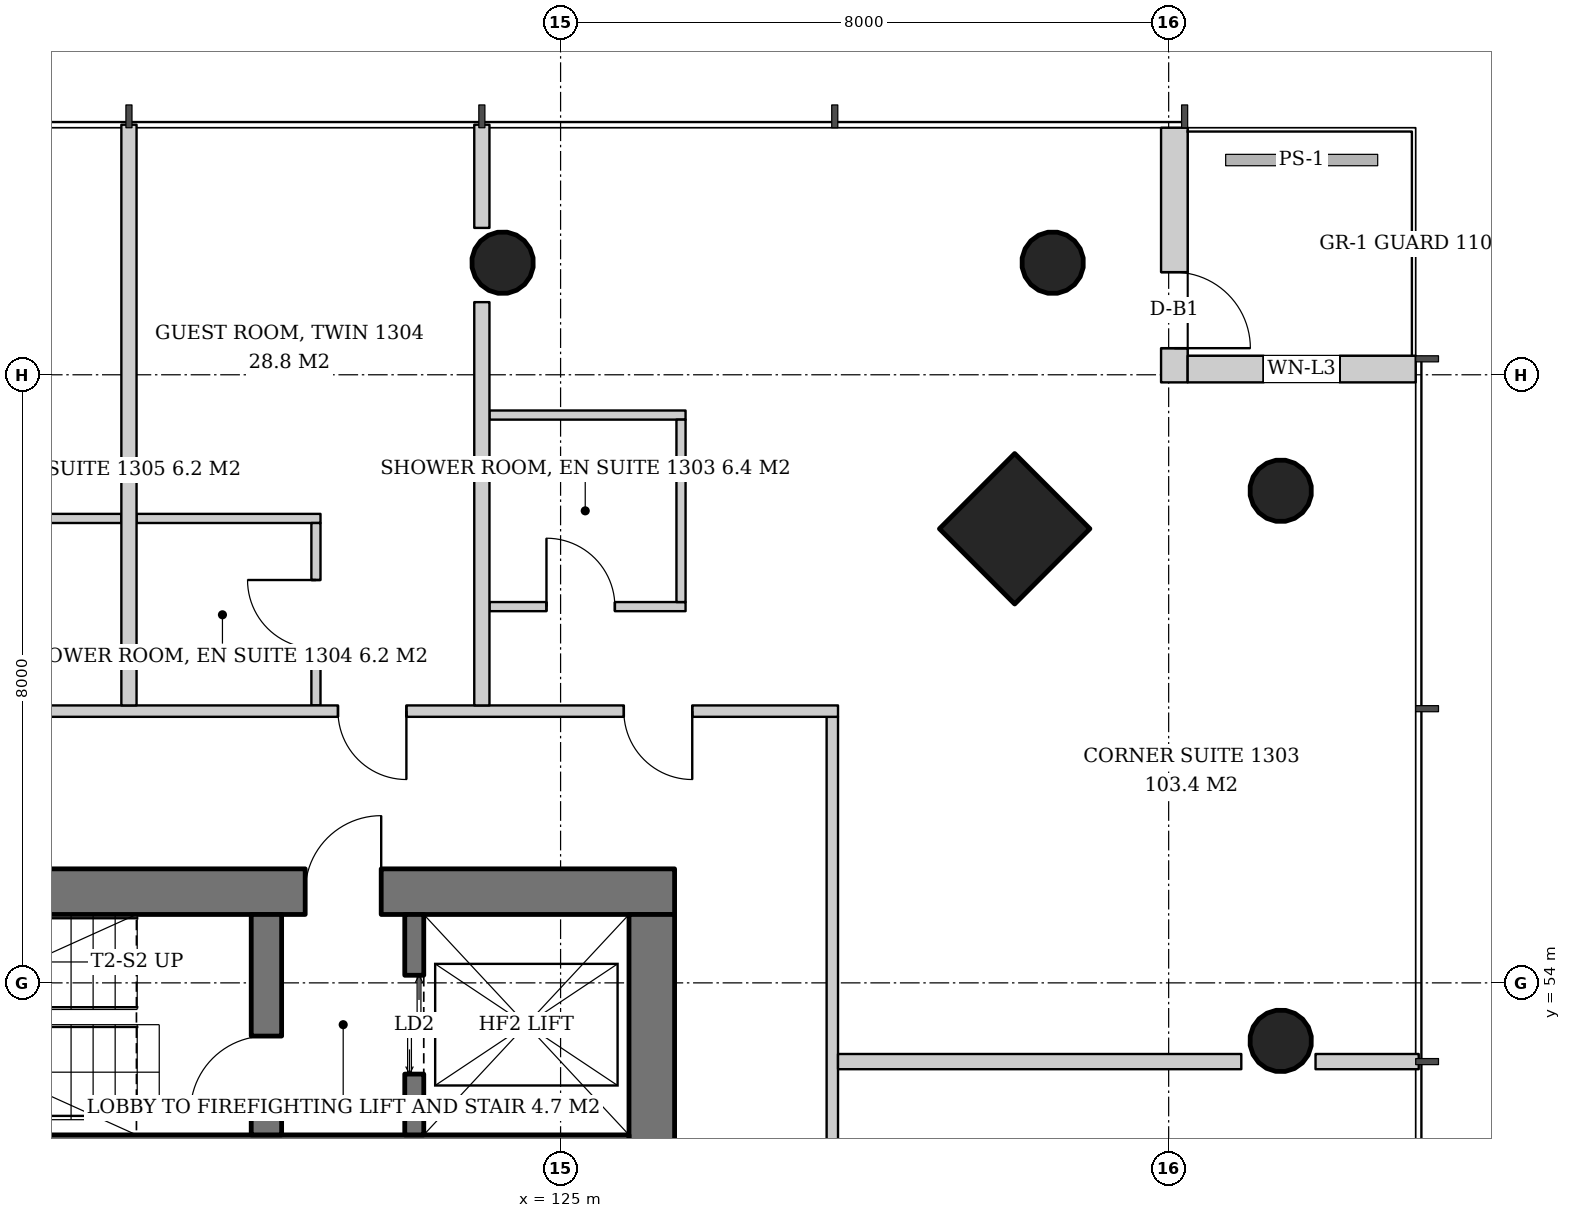
"""IFC4 building model, lengths in metres.
Left out: names, types, materials, properties, quantities, classifications, styles, units other than length and angle.
Written with IfcOpenShell. Run it as: python <this file> out.ifc"""

import sys

from ifc_helpers import new_model, si_unit, direction, frame, frame_2d, origin, origin_2d, place, context, subcontext, project, spatial, rectangle, hollow_circle, extrude, element, fill, save


model = new_model("IFC4")
c1 = context("Model", 3, precision=1e-05, world=origin(), true_north=direction((0.0, 1.0)))
c2 = subcontext(c1, "Body", "Model", "MODEL_VIEW")
j1 = project(units=[si_unit("LENGTHUNIT", "METRE"), si_unit("PLANEANGLEUNIT", "RADIAN")], contexts=[c1])
p1 = place(None, origin())
s1 = spatial("IfcSite", under=j1, at=p1, CompositionType="ELEMENT")
p2 = place(p1, origin())
s2 = spatial("IfcBuilding", under=s1, at=p2, CompositionType="ELEMENT")
p3 = place(p2, frame((0.0, 0.0, 55.2)))
s3 = spatial("IfcBuildingStorey", under=s2, at=p3, CompositionType="ELEMENT", Elevation=55.2)
p4 = place(p3, frame((131.026, 60.026, 0.0), z_axis=(-0.043029647111, -0.043029647111, 0.998146732169), x_axis=(0.707106781187, -0.707106781187, 0.0)))
e1 = element("IfcColumn", 1, at=p4, inside=s3, PredefinedType="COLUMN", context=c2, shape_type="SweptSolid", body=[
    extrude(rectangle(XDim=1.4, YDim=1.4, at=origin_2d()), origin(), (0.0, 0.0, 1.0), 3.807),
])
p5 = place(p3, frame((134.526, 60.526, 0.0), z_axis=(-0.043029647111, -0.043029647111, 0.998146732169), x_axis=(0.707106781187, -0.707106781187, 0.0)))
e2 = element("IfcColumn", 2, at=p5, inside=s3, PredefinedType="COLUMN", context=c2, shape_type="SweptSolid", body=[
    extrude(hollow_circle(Radius=0.406, WallThickness=0.03, at=origin_2d()), origin(), (0.0, 0.0, 1.0), 3.807),
])
p6 = place(p3, frame((134.526, 53.263, 0.0), z_axis=(-0.043059584825, -0.021497706284, 0.998841188968), x_axis=(0.446680166538, -0.894693706707, 0.0)))
e3 = element("IfcColumn", 3, at=p6, inside=s3, PredefinedType="COLUMN", context=c2, shape_type="SweptSolid", body=[
    extrude(hollow_circle(Radius=0.406, WallThickness=0.03, at=origin_2d()), origin(), (0.0, 0.0, 1.0), 3.804),
])
p7 = place(p3, frame((131.526, 63.526, 0.0), z_axis=(-0.043029647111, -0.043029647111, 0.998146732169), x_axis=(0.707106781187, -0.707106781187, 0.0)))
e4 = element("IfcColumn", 4, at=p7, inside=s3, PredefinedType="COLUMN", context=c2, shape_type="SweptSolid", body=[
    extrude(hollow_circle(Radius=0.406, WallThickness=0.03, at=origin_2d()), origin(), (0.0, 0.0, 1.0), 3.807),
])
p8 = place(p3, frame((124.263, 63.526, 0.0), z_axis=(-0.021497706284, -0.043059584825, 0.998841188968), x_axis=(0.894693706707, -0.446680166538, 0.0)))
e5 = element("IfcColumn", 5, at=p8, inside=s3, PredefinedType="COLUMN", context=c2, shape_type="SweptSolid", body=[
    extrude(hollow_circle(Radius=0.406, WallThickness=0.03, at=origin_2d()), origin(), (0.0, 0.0, 1.0), 3.804),
])
p9 = place(p3, frame((107.5, 55.2, 0.0), z_axis=(0.0, 0.0, 1.0), x_axis=(1.0, 0.0, 0.0)))
e6 = element("IfcWall", 6, at=p9, inside=s3, PredefinedType="SHEAR", context=c2, shape_type="SweptSolid", body=[
    extrude(rectangle(XDim=19.0, YDim=0.6, at=frame_2d((9.5, 0.0))), origin(), (0.0, 0.0, 1.0), 3.8),
])
p10 = place(p9, frame((14.14, 0.0, 0.0)))
e7 = element("IfcOpeningElement", 7, at=p10, cuts=e6, PredefinedType="OPENING", context=c2, shape_type="SweptSolid", body=[
    extrude(rectangle(XDim=1.0, YDim=2.1, at=frame_2d((0.5, 1.05))), frame((0.0, 0.31, 0.0), z_axis=(0.0, -1.0, 0.0), x_axis=(1.0, 0.0, 0.0)), (0.0, 0.0, 1.0), 0.62),
])
p11 = place(p9, frame((1.675, 0.0, 0.0)))
e8 = element("IfcOpeningElement", 8, at=p11, cuts=e6, PredefinedType="OPENING", context=c2, shape_type="SweptSolid", body=[
    extrude(rectangle(XDim=1.0, YDim=2.1, at=frame_2d((0.5, 1.05))), frame((0.0, 0.31, 0.0), z_axis=(0.0, -1.0, 0.0), x_axis=(1.0, 0.0, 0.0)), (0.0, 0.0, 1.0), 0.62),
])
p12 = place(p9, frame((3.587, 0.0, 0.0)))
e9 = element("IfcOpeningElement", 9, at=p12, cuts=e6, PredefinedType="OPENING", context=c2, shape_type="SweptSolid", body=[
    extrude(rectangle(XDim=1.0, YDim=2.1, at=frame_2d((0.5, 1.05))), frame((0.0, 0.31, 0.0), z_axis=(0.0, -1.0, 0.0), x_axis=(1.0, 0.0, 0.0)), (0.0, 0.0, 1.0), 0.62),
])
p13 = place(p3, frame((126.2, 37.1, 0.0), z_axis=(0.0, 0.0, 1.0), x_axis=(0.0, 1.0, 0.0)))
e10 = element("IfcWall", 10, at=p13, inside=s3, PredefinedType="SHEAR", context=c2, shape_type="SweptSolid", body=[
    extrude(rectangle(XDim=17.8, YDim=0.6, at=frame_2d((8.9, 0.0))), origin(), (0.0, 0.0, 1.0), 3.8),
])
p14 = place(p13, frame((8.0, 0.0, 0.0)))
e11 = element("IfcOpeningElement", 11, at=p14, cuts=e10, PredefinedType="OPENING", context=c2, shape_type="SweptSolid", body=[
    extrude(rectangle(XDim=1.8, YDim=2.4, at=frame_2d((0.9, 1.2))), frame((0.0, 0.31, 0.0), z_axis=(0.0, -1.0, 0.0), x_axis=(1.0, 0.0, 0.0)), (0.0, 0.0, 1.0), 0.62),
])
p15 = place(p3, frame((108.1, 51.8, 0.0), z_axis=(0.0, 0.0, 1.0), x_axis=(1.0, 0.0, 0.0)))
e12 = element("IfcWall", 12, at=p15, inside=s3, PredefinedType="SHEAR", context=c2, shape_type="SweptSolid", body=[
    extrude(rectangle(XDim=17.8, YDim=0.4, at=frame_2d((8.9, 0.0))), origin(), (0.0, 0.0, 1.0), 3.8),
])
p16 = place(p3, frame((121.13, 52.0, 0.0), z_axis=(0.0, 0.0, 1.0), x_axis=(0.0, 1.0, 0.0)))
e13 = element("IfcWall", 13, at=p16, inside=s3, PredefinedType="SHEAR", context=c2, shape_type="SweptSolid", body=[
    extrude(rectangle(XDim=2.9, YDim=0.4, at=frame_2d((1.45, 0.0))), origin(), (0.0, 0.0, 1.0), 3.8),
])
p17 = place(p16, frame((0.3, 0.0, 0.0)))
e14 = element("IfcOpeningElement", 14, at=p17, cuts=e13, PredefinedType="OPENING", context=c2, shape_type="SweptSolid", body=[
    extrude(rectangle(XDim=1.0, YDim=2.1, at=frame_2d((0.5, 1.05))), frame((0.0, 0.21, 0.0), z_axis=(0.0, -1.0, 0.0), x_axis=(1.0, 0.0, 0.0)), (0.0, 0.0, 1.0), 0.42),
])
p18 = place(p3, frame((133.075, 65.25, 0.0), z_axis=(0.0, 0.0, 1.0), x_axis=(0.0, -1.0, 0.0)))
e15 = element("IfcWall", 15, at=p18, inside=s3, PredefinedType="SOLIDWALL", context=c2, shape_type="SweptSolid", body=[
    extrude(rectangle(XDim=3.35, YDim=0.35, at=frame_2d((1.675, 0.0))), origin(), (0.0, 0.0, 1.0), 3.6),
])
p19 = place(p18, frame((1.9, 0.0, 0.0)))
e16 = element("IfcOpeningElement", 16, at=p19, cuts=e15, PredefinedType="OPENING", context=c2, shape_type="SweptSolid", body=[
    extrude(rectangle(XDim=1.0, YDim=2.4, at=frame_2d((0.5, 1.2))), frame((0.0, 0.185, 0.0), z_axis=(0.0, -1.0, 0.0), x_axis=(1.0, 0.0, 0.0)), (0.0, 0.0, 1.0), 0.37),
])
p20 = place(p3, frame((133.25, 62.075, 0.0), z_axis=(0.0, 0.0, 1.0), x_axis=(1.0, 0.0, 0.0)))
e17 = element("IfcWall", 17, at=p20, inside=s3, PredefinedType="SOLIDWALL", context=c2, shape_type="SweptSolid", body=[
    extrude(rectangle(XDim=3.0, YDim=0.35, at=frame_2d((1.5, 0.0))), origin(), (0.0, 0.0, 1.0), 3.6),
])
p21 = place(p20, frame((1.0, 0.0, 0.9)))
e18 = element("IfcOpeningElement", 18, at=p21, cuts=e17, PredefinedType="OPENING", context=c2, shape_type="SweptSolid", body=[
    extrude(rectangle(XDim=1.0, YDim=2.4, at=frame_2d((0.5, 1.2))), frame((0.0, 0.185, 0.0), z_axis=(0.0, -1.0, 0.0), x_axis=(1.0, 0.0, 0.0)), (0.0, 0.0, 1.0), 0.37),
])
p22 = place(p3, frame((123.075, 52.0, 0.0), z_axis=(0.0, 0.0, 1.0), x_axis=(0.0, 1.0, 0.0)))
e19 = element("IfcWall", 19, at=p22, inside=s3, PredefinedType="SHEAR", context=c2, shape_type="SweptSolid", body=[
    extrude(rectangle(XDim=2.9, YDim=0.25, at=frame_2d((1.45, 0.0))), origin(), (0.0, 0.0, 1.0), 3.8),
])
p23 = place(p22, frame((0.8, 0.0, 0.0)))
e20 = element("IfcOpeningElement", 20, at=p23, cuts=e19, PredefinedType="OPENING", context=c2, shape_type="SweptSolid", body=[
    extrude(rectangle(XDim=1.3, YDim=2.2, at=frame_2d((0.65, 1.1))), frame((0.0, 0.135, 0.0), z_axis=(0.0, -1.0, 0.0), x_axis=(1.0, 0.0, 0.0)), (0.0, 0.0, 1.0), 0.27),
])
p24 = place(p3, frame((128.575, 34.35, 0.0), z_axis=(0.0, 0.0, 1.0), x_axis=(0.0, 1.0, 0.0)))
e21 = element("IfcWall", 21, at=p24, inside=s3, PredefinedType="PARTITIONING", context=c2, shape_type="SweptSolid", body=[
    extrude(rectangle(XDim=23.15, YDim=0.15, at=frame_2d((11.575, 0.0))), origin(), (0.0, 0.0, 1.0), 2.8),
])
p25 = place(p24, frame((1.918, 0.0, 0.0)))
e22 = element("IfcOpeningElement", 22, at=p25, cuts=e21, PredefinedType="OPENING", context=c2, shape_type="SweptSolid", body=[
    extrude(rectangle(XDim=0.9, YDim=2.1, at=frame_2d((0.45, 1.05))), frame((0.0, 0.085, 0.0), z_axis=(0.0, -1.0, 0.0), x_axis=(1.0, 0.0, 0.0)), (0.0, 0.0, 1.0), 0.17),
])
p26 = place(p24, frame((12.079, 0.0, 0.0)))
e23 = element("IfcOpeningElement", 23, at=p26, cuts=e21, PredefinedType="OPENING", context=c2, shape_type="SweptSolid", body=[
    extrude(rectangle(XDim=0.9, YDim=2.1, at=frame_2d((0.45, 1.05))), frame((0.0, 0.085, 0.0), z_axis=(0.0, -1.0, 0.0), x_axis=(1.0, 0.0, 0.0)), (0.0, 0.0, 1.0), 0.17),
])
p27 = place(p3, frame((128.65, 52.964, 0.0), z_axis=(0.0, 0.0, 1.0), x_axis=(1.0, 0.0, 0.0)))
e24 = element("IfcWall", 24, at=p27, inside=s3, PredefinedType="PARTITIONING", context=c2, shape_type="SweptSolid", body=[
    extrude(rectangle(XDim=5.306, YDim=0.2, at=frame_2d((2.653, 0.0))), origin(), (0.0, 0.0, 1.0), 3.6),
])
p28 = place(p3, frame((134.932, 52.964, 0.0), z_axis=(0.0, 0.0, 1.0), x_axis=(1.0, 0.0, 0.0)))
e25 = element("IfcWall", 25, at=p28, inside=s3, PredefinedType="PARTITIONING", context=c2, shape_type="SweptSolid", body=[
    extrude(rectangle(XDim=1.358, YDim=0.2, at=frame_2d((0.679, 0.0))), origin(), (0.0, 0.0, 1.0), 3.6),
])
p29 = place(p3, frame((124.064, 58.95, 0.0), z_axis=(0.0, 0.0, 1.0), x_axis=(1.0, 0.0, 0.0)))
e26 = element("IfcWall", 26, at=p29, inside=s3, PredefinedType="PARTITIONING", context=c2, shape_type="SweptSolid", body=[
    extrude(rectangle(XDim=2.58, YDim=0.12, at=frame_2d((1.29, 0.0))), origin(), (0.0, 0.0, 1.0), 2.8),
])
p30 = place(p29, frame((0.75, 0.0, 0.0)))
e27 = element("IfcOpeningElement", 27, at=p30, cuts=e26, PredefinedType="OPENING", context=c2, shape_type="SweptSolid", body=[
    extrude(rectangle(XDim=0.9, YDim=2.1, at=frame_2d((0.45, 1.05))), frame((0.0, 0.07, 0.0), z_axis=(0.0, -1.0, 0.0), x_axis=(1.0, 0.0, 0.0)), (0.0, 0.0, 1.0), 0.14),
])
p31 = place(p3, frame((124.064, 61.47, 0.0), z_axis=(0.0, 0.0, 1.0), x_axis=(1.0, 0.0, 0.0)))
e28 = element("IfcWall", 28, at=p31, inside=s3, PredefinedType="PARTITIONING", context=c2, shape_type="SweptSolid", body=[
    extrude(rectangle(XDim=2.58, YDim=0.12, at=frame_2d((1.29, 0.0))), origin(), (0.0, 0.0, 1.0), 2.8),
])
p32 = place(p3, frame((126.584, 59.01, 0.0), z_axis=(0.0, 0.0, 1.0), x_axis=(0.0, 1.0, 0.0)))
e29 = element("IfcWall", 29, at=p32, inside=s3, PredefinedType="PARTITIONING", context=c2, shape_type="SweptSolid", body=[
    extrude(rectangle(XDim=2.4, YDim=0.12, at=frame_2d((1.2, 0.0))), origin(), (0.0, 0.0, 1.0), 2.847),
])
p33 = place(p3, frame((121.841, 60.11, 0.0), z_axis=(0.0, 0.0, 1.0), x_axis=(-1.0, 0.0, 0.0)))
e30 = element("IfcWall", 30, at=p33, inside=s3, PredefinedType="PARTITIONING", context=c2, shape_type="SweptSolid", body=[
    extrude(rectangle(XDim=2.42, YDim=0.12, at=frame_2d((1.21, 0.0))), origin(), (0.0, 0.0, 1.0), 2.847),
])
p34 = place(p3, frame((121.781, 57.65, 0.0), z_axis=(0.0, 0.0, 1.0), x_axis=(0.0, 1.0, 0.0)))
e31 = element("IfcWall", 31, at=p34, inside=s3, PredefinedType="PARTITIONING", context=c2, shape_type="SweptSolid", body=[
    extrude(rectangle(XDim=2.4, YDim=0.12, at=frame_2d((1.2, 0.0))), origin(), (0.0, 0.0, 1.0), 2.847),
])
p35 = place(p34, frame((0.75, 0.0, 0.0)))
e32 = element("IfcOpeningElement", 32, at=p35, cuts=e31, PredefinedType="OPENING", context=c2, shape_type="SweptSolid", body=[
    extrude(rectangle(XDim=0.9, YDim=2.1, at=frame_2d((0.45, 1.05))), frame((0.0, 0.07, 0.0), z_axis=(0.0, -1.0, 0.0), x_axis=(1.0, 0.0, 0.0)), (0.0, 0.0, 1.0), 0.14),
])
p36 = place(p3, frame((119.221, 60.11, 0.0), z_axis=(0.0, 0.0, 1.0), x_axis=(-1.0, 0.0, 0.0)))
e33 = element("IfcWall", 33, at=p36, inside=s3, PredefinedType="PARTITIONING", context=c2, shape_type="SweptSolid", body=[
    extrude(rectangle(XDim=2.42, YDim=0.12, at=frame_2d((1.21, 0.0))), origin(), (0.0, 0.0, 1.0), 2.847),
])
p37 = place(p3, frame((128.65, 57.575, 0.0), z_axis=(0.0, 0.0, 1.0), x_axis=(-1.0, 0.0, 0.0)))
e34 = element("IfcWall", 34, at=p37, inside=s3, PredefinedType="PARTITIONING", context=c2, shape_type="SweptSolid", body=[
    extrude(rectangle(XDim=23.15, YDim=0.15, at=frame_2d((11.575, 0.0))), origin(), (0.0, 0.0, 1.0), 2.8),
])
p38 = place(p37, frame((1.918, 0.0, 0.0)))
e35 = element("IfcOpeningElement", 35, at=p38, cuts=e34, PredefinedType="OPENING", context=c2, shape_type="SweptSolid", body=[
    extrude(rectangle(XDim=0.9, YDim=2.1, at=frame_2d((0.45, 1.05))), frame((0.0, 0.085, 0.0), z_axis=(0.0, -1.0, 0.0), x_axis=(1.0, 0.0, 0.0)), (0.0, 0.0, 1.0), 0.17),
])
p39 = place(p37, frame((5.678, 0.0, 0.0)))
e36 = element("IfcOpeningElement", 36, at=p39, cuts=e34, PredefinedType="OPENING", context=c2, shape_type="SweptSolid", body=[
    extrude(rectangle(XDim=0.9, YDim=2.1, at=frame_2d((0.45, 1.05))), frame((0.0, 0.085, 0.0), z_axis=(0.0, -1.0, 0.0), x_axis=(1.0, 0.0, 0.0)), (0.0, 0.0, 1.0), 0.17),
])
p40 = place(p37, frame((12.079, 0.0, 0.0)))
e37 = element("IfcOpeningElement", 37, at=p40, cuts=e34, PredefinedType="OPENING", context=c2, shape_type="SweptSolid", body=[
    extrude(rectangle(XDim=0.9, YDim=2.1, at=frame_2d((0.45, 1.05))), frame((0.0, 0.085, 0.0), z_axis=(0.0, -1.0, 0.0), x_axis=(1.0, 0.0, 0.0)), (0.0, 0.0, 1.0), 0.17),
])
p41 = place(p3, frame((123.964, 57.65, 0.0), z_axis=(0.0, 0.0, 1.0), x_axis=(0.0, 1.0, 0.0)))
e38 = element("IfcWall", 38, at=p41, inside=s3, PredefinedType="PARTITIONING", context=c2, shape_type="SweptSolid", body=[
    extrude(rectangle(XDim=5.306, YDim=0.2, at=frame_2d((2.653, 0.0))), origin(), (0.0, 0.0, 1.0), 3.6),
])
p42 = place(p3, frame((123.964, 63.932, 0.0), z_axis=(0.0, 0.0, 1.0), x_axis=(0.0, 1.0, 0.0)))
e39 = element("IfcWall", 39, at=p42, inside=s3, PredefinedType="PARTITIONING", context=c2, shape_type="SweptSolid", body=[
    extrude(rectangle(XDim=1.358, YDim=0.2, at=frame_2d((0.679, 0.0))), origin(), (0.0, 0.0, 1.0), 3.6),
])
p43 = place(p3, frame((119.322, 57.65, 0.0), z_axis=(0.0, 0.0, 1.0), x_axis=(0.0, 1.0, 0.0)))
e40 = element("IfcWall", 40, at=p43, inside=s3, PredefinedType="PARTITIONING", context=c2, shape_type="SweptSolid", body=[
    extrude(rectangle(XDim=7.64, YDim=0.2, at=frame_2d((3.82, 0.0))), origin(), (0.0, 0.0, 1.0), 3.05),
])
p44 = place(p19, origin())
e41 = element("IfcDoor", 41, at=p44, inside=s3, OperationType="SINGLE_SWING_RIGHT", PredefinedType="DOOR", context=c2, shape_type="SweptSolid", body=[
    extrude(rectangle(XDim=1.0, YDim=2.4, at=frame_2d((0.5, 1.2))), frame((0.0, 0.025, 0.0), z_axis=(0.0, -1.0, 0.0), x_axis=(1.0, 0.0, 0.0)), (0.0, 0.0, 1.0), 0.05),
])
fill(e16, e41)
p45 = place(p21, origin())
e42 = element("IfcWindow", 42, at=p45, inside=s3, PartitioningType="SINGLE_PANEL", PredefinedType="WINDOW", context=c2, shape_type="SweptSolid", body=[
    extrude(rectangle(XDim=1.0, YDim=2.4, at=frame_2d((0.5, 1.2))), frame((0.0, 0.03, 0.0), z_axis=(0.0, -1.0, 0.0), x_axis=(1.0, 0.0, 0.0)), (0.0, 0.0, 1.0), 0.06),
])
fill(e18, e42)
p46 = place(p23, origin())
e43 = element("IfcDoor", 43, at=p46, inside=s3, OperationType="DOUBLE_DOOR_SLIDING", PredefinedType="DOOR", context=c2, shape_type="SweptSolid", body=[
    extrude(rectangle(XDim=1.3, YDim=2.2, at=frame_2d((0.65, 1.1))), frame((0.0, 0.025, 0.0), z_axis=(0.0, -1.0, 0.0), x_axis=(1.0, 0.0, 0.0)), (0.0, 0.0, 1.0), 0.05),
])
fill(e20, e43)
p47 = place(p17, origin())
e44 = element("IfcDoor", 44, at=p47, inside=s3, OperationType="SINGLE_SWING_LEFT", PredefinedType="DOOR", context=c2, shape_type="SweptSolid", body=[
    extrude(rectangle(XDim=1.0, YDim=2.1, at=frame_2d((0.5, 1.05))), frame((0.0, 0.025, 0.0), z_axis=(0.0, -1.0, 0.0), x_axis=(1.0, 0.0, 0.0)), (0.0, 0.0, 1.0), 0.05),
])
fill(e14, e44)
p48 = place(p10, origin())
e45 = element("IfcDoor", 45, at=p48, inside=s3, OperationType="SINGLE_SWING_RIGHT", PredefinedType="DOOR", context=c2, shape_type="SweptSolid", body=[
    extrude(rectangle(XDim=1.0, YDim=2.1, at=frame_2d((0.5, 1.05))), frame((0.0, 0.025, 0.0), z_axis=(0.0, -1.0, 0.0), x_axis=(1.0, 0.0, 0.0)), (0.0, 0.0, 1.0), 0.05),
])
fill(e7, e45)
p49 = place(p30, origin())
e46 = element("IfcDoor", 46, at=p49, inside=s3, OperationType="SINGLE_SWING_LEFT", PredefinedType="DOOR", context=c2, shape_type="SweptSolid", body=[
    extrude(rectangle(XDim=0.9, YDim=2.1, at=frame_2d((0.45, 1.05))), frame((0.0, 0.025, 0.0), z_axis=(0.0, -1.0, 0.0), x_axis=(1.0, 0.0, 0.0)), (0.0, 0.0, 1.0), 0.05),
])
fill(e27, e46)
p50 = place(p35, origin())
e47 = element("IfcDoor", 47, at=p50, inside=s3, OperationType="SINGLE_SWING_RIGHT", PredefinedType="DOOR", context=c2, shape_type="SweptSolid", body=[
    extrude(rectangle(XDim=0.9, YDim=2.1, at=frame_2d((0.45, 1.05))), frame((0.0, 0.025, 0.0), z_axis=(0.0, -1.0, 0.0), x_axis=(1.0, 0.0, 0.0)), (0.0, 0.0, 1.0), 0.05),
])
fill(e32, e47)
p51 = place(p38, origin())
e48 = element("IfcDoor", 48, at=p51, inside=s3, OperationType="SINGLE_SWING_LEFT", PredefinedType="DOOR", context=c2, shape_type="SweptSolid", body=[
    extrude(rectangle(XDim=0.9, YDim=2.1, at=frame_2d((0.45, 1.05))), frame((0.0, 0.025, 0.0), z_axis=(0.0, -1.0, 0.0), x_axis=(1.0, 0.0, 0.0)), (0.0, 0.0, 1.0), 0.05),
])
fill(e35, e48)
p52 = place(p39, origin())
e49 = element("IfcDoor", 49, at=p52, inside=s3, OperationType="SINGLE_SWING_LEFT", PredefinedType="DOOR", context=c2, shape_type="SweptSolid", body=[
    extrude(rectangle(XDim=0.9, YDim=2.1, at=frame_2d((0.45, 1.05))), frame((0.0, 0.025, 0.0), z_axis=(0.0, -1.0, 0.0), x_axis=(1.0, 0.0, 0.0)), (0.0, 0.0, 1.0), 0.05),
])
fill(e36, e49)
save(model, sys.argv[1])
